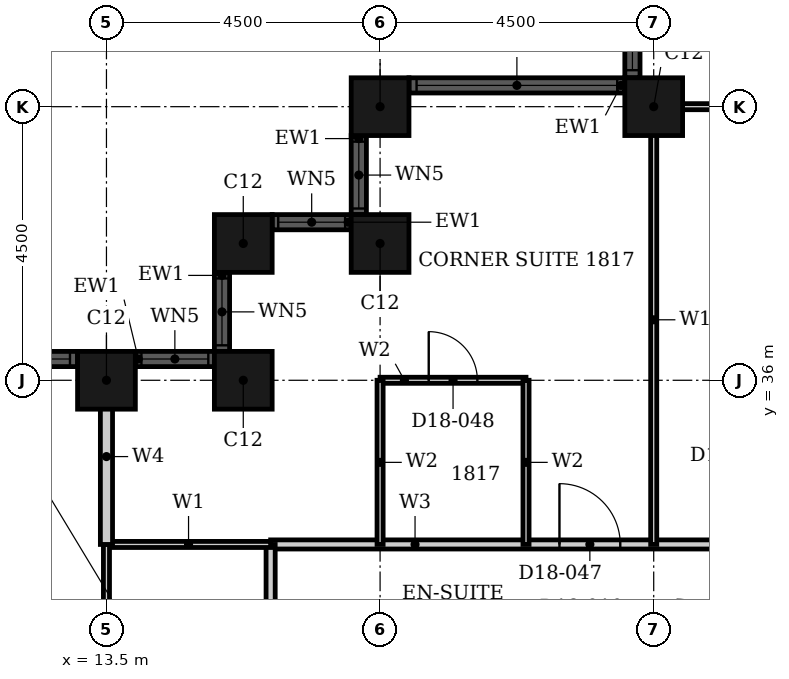
"""IFC4 building model, lengths in metres.
Left out: names, types, materials, properties, quantities, classifications, styles, units other than length and angle.
Written with IfcOpenShell. Run it as: python <this file> out.ifc"""

import sys

from ifc_helpers import new_model, si_unit, direction, frame, frame_2d, origin, origin_2d, place, context, subcontext, project, spatial, rectangle, hollow_rectangle, extrude, element, fill, save


model = new_model("IFC4")
c1 = context("Model", 3, precision=1e-05, world=origin(), true_north=direction((0.0, 1.0)))
c2 = subcontext(c1, "Body", "Model", "MODEL_VIEW")
j1 = project(units=[si_unit("LENGTHUNIT", "METRE"), si_unit("PLANEANGLEUNIT", "RADIAN")], contexts=[c1])
p1 = place(None, origin())
s1 = spatial("IfcSite", under=j1, at=p1, CompositionType="ELEMENT")
p2 = place(p1, origin())
s2 = spatial("IfcBuilding", under=s1, at=p2, CompositionType="ELEMENT")
p3 = place(p2, frame((0.0, 0.0, 78.0)))
s3 = spatial("IfcBuildingStorey", under=s2, at=p3, CompositionType="ELEMENT", Elevation=78.0)
for number, where, z_axis, x_axis in (
    (1, (22.5, 40.5, 0.0), (0.0, 0.0, 1.0), (1.0, 0.0, 0.0)),
    (2, (18.0, 40.5, 0.0), (0.0, 0.0, 1.0), (1.0, 0.0, 0.0)),
    (3, (18.0, 38.25, 0.0), (0.0, 0.0, 1.0), (1.0, 0.0, 0.0)),
    (4, (15.75, 38.25, 0.0), (0.0, 0.0, 1.0), (1.0, 0.0, 0.0)),
    (5, (15.75, 36.0, 0.0), (0.0, 0.0, 1.0), (1.0, 0.0, 0.0)),
    (6, (13.5, 36.0, 0.0), (0.0, 0.0, 1.0), (1.0, 0.0, 0.0)),
):
    element("IfcColumn", number, at=place(p3, frame(where, z_axis=z_axis, x_axis=x_axis)), inside=s3, PredefinedType="COLUMN", context=c2, shape_type="SweptSolid", body=[
        extrude(hollow_rectangle(XDim=0.95, YDim=0.95, WallThickness=0.03, at=origin_2d()), origin(), (0.0, 0.0, 1.0), 3.6),
    ])
p4 = place(p3, frame((22.15, 49.025, 0.0), z_axis=(0.0, 0.0, 1.0), x_axis=(0.0, -1.0, 0.0)))
e7 = element("IfcWall", 7, at=p4, inside=s3, PredefinedType="SOLIDWALL", context=c2, shape_type="SweptSolid", body=[
    extrude(rectangle(XDim=8.05, YDim=0.25, at=frame_2d((4.025, 0.0))), origin(), (0.0, 0.0, 1.0), 3.6),
])
p5 = place(p4, frame((0.125, 0.0, 0.9)))
e8 = element("IfcOpeningElement", 8, at=p5, cuts=e7, PredefinedType="OPENING", context=c2, shape_type="SweptSolid", body=[
    extrude(rectangle(XDim=3.3, YDim=2.08, at=frame_2d((1.65, 1.04))), frame((0.0, 0.135, 0.0), z_axis=(0.0, -1.0, 0.0), x_axis=(1.0, 0.0, 0.0)), (0.0, 0.0, 1.0), 0.27),
])
p6 = place(p4, frame((4.625, 0.0, 0.9)))
e9 = element("IfcOpeningElement", 9, at=p6, cuts=e7, PredefinedType="OPENING", context=c2, shape_type="SweptSolid", body=[
    extrude(rectangle(XDim=3.3, YDim=2.08, at=frame_2d((1.65, 1.04))), frame((0.0, 0.135, 0.0), z_axis=(0.0, -1.0, 0.0), x_axis=(1.0, 0.0, 0.0)), (0.0, 0.0, 1.0), 0.27),
])
p7 = place(p3, frame((22.025, 40.85, 0.0), z_axis=(0.0, 0.0, 1.0), x_axis=(-1.0, 0.0, 0.0)))
e10 = element("IfcWall", 10, at=p7, inside=s3, PredefinedType="SOLIDWALL", context=c2, shape_type="SweptSolid", body=[
    extrude(rectangle(XDim=3.55, YDim=0.25, at=frame_2d((1.775, 0.0))), origin(), (0.0, 0.0, 1.0), 3.6),
])
p8 = place(p7, frame((0.125, 0.0, 0.9)))
e11 = element("IfcOpeningElement", 11, at=p8, cuts=e10, PredefinedType="OPENING", context=c2, shape_type="SweptSolid", body=[
    extrude(rectangle(XDim=3.3, YDim=2.08, at=frame_2d((1.65, 1.04))), frame((0.0, 0.135, 0.0), z_axis=(0.0, -1.0, 0.0), x_axis=(1.0, 0.0, 0.0)), (0.0, 0.0, 1.0), 0.27),
])
p9 = place(p3, frame((17.65, 40.025, 0.0), z_axis=(0.0, 0.0, 1.0), x_axis=(0.0, -1.0, 0.0)))
e12 = element("IfcWall", 12, at=p9, inside=s3, PredefinedType="SOLIDWALL", context=c2, shape_type="SweptSolid", body=[
    extrude(rectangle(XDim=1.3, YDim=0.25, at=frame_2d((0.65, 0.0))), origin(), (0.0, 0.0, 1.0), 3.6),
])
p10 = place(p9, frame((0.1, 0.0, 0.9)))
e13 = element("IfcOpeningElement", 13, at=p10, cuts=e12, PredefinedType="OPENING", context=c2, shape_type="SweptSolid", body=[
    extrude(rectangle(XDim=1.1, YDim=2.08, at=frame_2d((0.55, 1.04))), frame((0.0, 0.135, 0.0), z_axis=(0.0, -1.0, 0.0), x_axis=(1.0, 0.0, 0.0)), (0.0, 0.0, 1.0), 0.27),
])
p11 = place(p3, frame((17.525, 38.6, 0.0), z_axis=(0.0, 0.0, 1.0), x_axis=(-1.0, 0.0, 0.0)))
e14 = element("IfcWall", 14, at=p11, inside=s3, PredefinedType="SOLIDWALL", context=c2, shape_type="SweptSolid", body=[
    extrude(rectangle(XDim=1.3, YDim=0.25, at=frame_2d((0.65, 0.0))), origin(), (0.0, 0.0, 1.0), 3.6),
])
p12 = place(p11, frame((0.1, 0.0, 0.9)))
e15 = element("IfcOpeningElement", 15, at=p12, cuts=e14, PredefinedType="OPENING", context=c2, shape_type="SweptSolid", body=[
    extrude(rectangle(XDim=1.1, YDim=2.08, at=frame_2d((0.55, 1.04))), frame((0.0, 0.135, 0.0), z_axis=(0.0, -1.0, 0.0), x_axis=(1.0, 0.0, 0.0)), (0.0, 0.0, 1.0), 0.27),
])
p13 = place(p3, frame((15.4, 37.775, 0.0), z_axis=(0.0, 0.0, 1.0), x_axis=(0.0, -1.0, 0.0)))
e16 = element("IfcWall", 16, at=p13, inside=s3, PredefinedType="SOLIDWALL", context=c2, shape_type="SweptSolid", body=[
    extrude(rectangle(XDim=1.3, YDim=0.25, at=frame_2d((0.65, 0.0))), origin(), (0.0, 0.0, 1.0), 3.6),
])
p14 = place(p13, frame((0.1, 0.0, 0.9)))
e17 = element("IfcOpeningElement", 17, at=p14, cuts=e16, PredefinedType="OPENING", context=c2, shape_type="SweptSolid", body=[
    extrude(rectangle(XDim=1.1, YDim=2.08, at=frame_2d((0.55, 1.04))), frame((0.0, 0.135, 0.0), z_axis=(0.0, -1.0, 0.0), x_axis=(1.0, 0.0, 0.0)), (0.0, 0.0, 1.0), 0.27),
])
p15 = place(p3, frame((15.275, 36.35, 0.0), z_axis=(0.0, 0.0, 1.0), x_axis=(-1.0, 0.0, 0.0)))
e18 = element("IfcWall", 18, at=p15, inside=s3, PredefinedType="SOLIDWALL", context=c2, shape_type="SweptSolid", body=[
    extrude(rectangle(XDim=1.3, YDim=0.25, at=frame_2d((0.65, 0.0))), origin(), (0.0, 0.0, 1.0), 3.6),
])
p16 = place(p15, frame((0.1, 0.0, 0.9)))
e19 = element("IfcOpeningElement", 19, at=p16, cuts=e18, PredefinedType="OPENING", context=c2, shape_type="SweptSolid", body=[
    extrude(rectangle(XDim=1.1, YDim=2.08, at=frame_2d((0.55, 1.04))), frame((0.0, 0.135, 0.0), z_axis=(0.0, -1.0, 0.0), x_axis=(1.0, 0.0, 0.0)), (0.0, 0.0, 1.0), 0.27),
])
p17 = place(p3, frame((13.025, 36.35, 0.0), z_axis=(0.0, 0.0, 1.0), x_axis=(-1.0, 0.0, 0.0)))
e20 = element("IfcWall", 20, at=p17, inside=s3, PredefinedType="SOLIDWALL", context=c2, shape_type="SweptSolid", body=[
    extrude(rectangle(XDim=8.05, YDim=0.25, at=frame_2d((4.025, 0.0))), origin(), (0.0, 0.0, 1.0), 3.6),
])
p18 = place(p17, frame((0.125, 0.0, 0.9)))
e21 = element("IfcOpeningElement", 21, at=p18, cuts=e20, PredefinedType="OPENING", context=c2, shape_type="SweptSolid", body=[
    extrude(rectangle(XDim=3.3, YDim=2.08, at=frame_2d((1.65, 1.04))), frame((0.0, 0.135, 0.0), z_axis=(0.0, -1.0, 0.0), x_axis=(1.0, 0.0, 0.0)), (0.0, 0.0, 1.0), 0.27),
])
p19 = place(p17, frame((4.625, 0.0, 0.9)))
e22 = element("IfcOpeningElement", 22, at=p19, cuts=e20, PredefinedType="OPENING", context=c2, shape_type="SweptSolid", body=[
    extrude(rectangle(XDim=3.3, YDim=2.08, at=frame_2d((1.65, 1.04))), frame((0.0, 0.135, 0.0), z_axis=(0.0, -1.0, 0.0), x_axis=(1.0, 0.0, 0.0)), (0.0, 0.0, 1.0), 0.27),
])
p20 = place(p3, frame((16.2, 33.3, 0.0), z_axis=(0.0, 0.0, 1.0), x_axis=(1.0, 0.0, 0.0)))
e23 = element("IfcWall", 23, at=p20, inside=s3, PredefinedType="PARTITIONING", context=c2, shape_type="SweptSolid", body=[
    extrude(rectangle(XDim=15.3, YDim=0.15, at=frame_2d((7.65, 0.0))), origin(), (0.0, 0.0, 1.0), 3.3),
])
p21 = place(p20, frame((4.75, 0.0, 0.0)))
e24 = element("IfcOpeningElement", 24, at=p21, cuts=e23, PredefinedType="OPENING", context=c2, shape_type="SweptSolid", body=[
    extrude(rectangle(XDim=1.0, YDim=2.1, at=frame_2d((0.5, 1.05))), frame((0.0, 0.085, 0.0), z_axis=(0.0, -1.0, 0.0), x_axis=(1.0, 0.0, 0.0)), (0.0, 0.0, 1.0), 0.17),
])
p22 = place(p20, frame((7.65, 0.0, 0.0)))
e25 = element("IfcOpeningElement", 25, at=p22, cuts=e23, PredefinedType="OPENING", context=c2, shape_type="SweptSolid", body=[
    extrude(rectangle(XDim=0.9, YDim=2.1, at=frame_2d((0.45, 1.05))), frame((0.0, 0.085, 0.0), z_axis=(0.0, -1.0, 0.0), x_axis=(1.0, 0.0, 0.0)), (0.0, 0.0, 1.0), 0.17),
])
p23 = place(p20, frame((12.15, 0.0, 0.0)))
e26 = element("IfcOpeningElement", 26, at=p23, cuts=e23, PredefinedType="OPENING", context=c2, shape_type="SweptSolid", body=[
    extrude(rectangle(XDim=0.9, YDim=2.1, at=frame_2d((0.45, 1.05))), frame((0.0, 0.085, 0.0), z_axis=(0.0, -1.0, 0.0), x_axis=(1.0, 0.0, 0.0)), (0.0, 0.0, 1.0), 0.17),
])
p24 = place(p3, frame((16.2, 27.0, 0.0), z_axis=(0.0, 0.0, 1.0), x_axis=(0.0, 1.0, 0.0)))
e27 = element("IfcWall", 27, at=p24, inside=s3, PredefinedType="PARTITIONING", context=c2, shape_type="SweptSolid", body=[
    extrude(rectangle(XDim=6.3, YDim=0.15, at=frame_2d((3.15, 0.0))), origin(), (0.0, 0.0, 1.0), 3.3),
])
p25 = place(p24, frame((2.55, 0.0, 0.0)))
e28 = element("IfcOpeningElement", 28, at=p25, cuts=e27, PredefinedType="OPENING", context=c2, shape_type="SweptSolid", body=[
    extrude(rectangle(XDim=0.9, YDim=2.1, at=frame_2d((0.45, 1.05))), frame((0.0, 0.085, 0.0), z_axis=(0.0, -1.0, 0.0), x_axis=(1.0, 0.0, 0.0)), (0.0, 0.0, 1.0), 0.17),
])
p26 = place(p3, frame((13.5, 33.3, 0.0), z_axis=(0.0, 0.0, 1.0), x_axis=(1.0, 0.0, 0.0)))
e29 = element("IfcWall", 29, at=p26, inside=s3, PredefinedType="PARTITIONING", context=c2, shape_type="SweptSolid", body=[
    extrude(rectangle(XDim=2.7, YDim=0.1, at=frame_2d((1.35, 0.0))), origin(), (0.0, 0.0, 1.0), 3.3),
])
p27 = place(p3, frame((22.31, 40.5, 0.0), z_axis=(0.0, 0.0, 1.0), x_axis=(1.0, 0.0, 0.0)))
e30 = element("IfcWall", 30, at=p27, inside=s3, PredefinedType="PARTITIONING", context=c2, shape_type="SweptSolid", body=[
    extrude(rectangle(XDim=9.19, YDim=0.1, at=frame_2d((4.595, 0.0))), origin(), (0.0, 0.0, 1.0), 2.38),
])
p28 = place(p3, frame((13.5, 27.0, 0.0), z_axis=(0.0, 0.0, 1.0), x_axis=(0.0, 1.0, 0.0)))
e31 = element("IfcWall", 31, at=p28, inside=s3, PredefinedType="PARTITIONING", context=c2, shape_type="SweptSolid", body=[
    extrude(rectangle(XDim=6.3, YDim=0.1, at=frame_2d((3.15, 0.0))), origin(), (0.0, 0.0, 1.0), 2.38),
])
p29 = place(p3, frame((22.5, 33.3, 0.0), z_axis=(0.0, 0.0, 1.0), x_axis=(0.0, 1.0, 0.0)))
e32 = element("IfcWall", 32, at=p29, inside=s3, PredefinedType="PARTITIONING", context=c2, shape_type="SweptSolid", body=[
    extrude(rectangle(XDim=7.39, YDim=0.1, at=frame_2d((3.695, 0.0))), origin(), (0.0, 0.0, 1.0), 3.3),
])
p30 = place(p3, frame((13.5, 33.3, 0.0), z_axis=(0.0, 0.0, 1.0), x_axis=(0.0, 1.0, 0.0)))
e33 = element("IfcWall", 33, at=p30, inside=s3, PredefinedType="PARTITIONING", context=c2, shape_type="SweptSolid", body=[
    extrude(rectangle(XDim=2.89, YDim=0.2, at=frame_2d((1.445, 0.0))), origin(), (0.0, 0.0, 1.0), 2.38),
])
p31 = place(p3, frame((18.0, 36.0, 0.0), z_axis=(0.0, 0.0, 1.0), x_axis=(1.0, 0.0, 0.0)))
e34 = element("IfcWall", 34, at=p31, inside=s3, PredefinedType="PARTITIONING", context=c2, shape_type="SweptSolid", body=[
    extrude(rectangle(XDim=2.4, YDim=0.1, at=frame_2d((1.2, 0.0))), origin(), (0.0, 0.0, 1.0), 3.3),
])
p32 = place(p31, frame((0.8, 0.0, 0.0)))
e35 = element("IfcOpeningElement", 35, at=p32, cuts=e34, PredefinedType="OPENING", context=c2, shape_type="SweptSolid", body=[
    extrude(rectangle(XDim=0.8, YDim=2.1, at=frame_2d((0.4, 1.05))), frame((0.0, 0.06, 0.0), z_axis=(0.0, -1.0, 0.0), x_axis=(1.0, 0.0, 0.0)), (0.0, 0.0, 1.0), 0.12),
])
for number, where, z_axis, x_axis in (
    (36, (18.0, 33.3, 0.0), (0.0, 0.0, 1.0), (0.0, 1.0, 0.0)),
    (37, (20.4, 33.3, 0.0), (0.0, 0.0, 1.0), (0.0, 1.0, 0.0)),
):
    element("IfcWall", number, at=place(p3, frame(where, z_axis=z_axis, x_axis=x_axis)), inside=s3, PredefinedType="PARTITIONING", context=c2, shape_type="SweptSolid", body=[
        extrude(rectangle(XDim=2.7, YDim=0.1, at=frame_2d((1.35, 0.0))), origin(), (0.0, 0.0, 1.0), 3.3),
    ])
p33 = place(p6, origin())
e38 = element("IfcWindow", 38, at=p33, inside=s3, PartitioningType="SINGLE_PANEL", PredefinedType="WINDOW", context=c2, shape_type="SweptSolid", body=[
    extrude(rectangle(XDim=3.3, YDim=2.08, at=frame_2d((1.65, 1.04))), frame((0.0, 0.03, 0.0), z_axis=(0.0, -1.0, 0.0), x_axis=(1.0, 0.0, 0.0)), (0.0, 0.0, 1.0), 0.06),
])
fill(e9, e38)
p34 = place(p8, origin())
e39 = element("IfcWindow", 39, at=p34, inside=s3, PartitioningType="SINGLE_PANEL", PredefinedType="WINDOW", context=c2, shape_type="SweptSolid", body=[
    extrude(rectangle(XDim=3.3, YDim=2.08, at=frame_2d((1.65, 1.04))), frame((0.0, 0.03, 0.0), z_axis=(0.0, -1.0, 0.0), x_axis=(1.0, 0.0, 0.0)), (0.0, 0.0, 1.0), 0.06),
])
fill(e11, e39)
p35 = place(p10, origin())
e40 = element("IfcWindow", 40, at=p35, inside=s3, PartitioningType="SINGLE_PANEL", PredefinedType="WINDOW", context=c2, shape_type="SweptSolid", body=[
    extrude(rectangle(XDim=1.1, YDim=2.08, at=frame_2d((0.55, 1.04))), frame((0.0, 0.03, 0.0), z_axis=(0.0, -1.0, 0.0), x_axis=(1.0, 0.0, 0.0)), (0.0, 0.0, 1.0), 0.06),
])
fill(e13, e40)
p36 = place(p12, origin())
e41 = element("IfcWindow", 41, at=p36, inside=s3, PartitioningType="SINGLE_PANEL", PredefinedType="WINDOW", context=c2, shape_type="SweptSolid", body=[
    extrude(rectangle(XDim=1.1, YDim=2.08, at=frame_2d((0.55, 1.04))), frame((0.0, 0.03, 0.0), z_axis=(0.0, -1.0, 0.0), x_axis=(1.0, 0.0, 0.0)), (0.0, 0.0, 1.0), 0.06),
])
fill(e15, e41)
p37 = place(p14, origin())
e42 = element("IfcWindow", 42, at=p37, inside=s3, PartitioningType="SINGLE_PANEL", PredefinedType="WINDOW", context=c2, shape_type="SweptSolid", body=[
    extrude(rectangle(XDim=1.1, YDim=2.08, at=frame_2d((0.55, 1.04))), frame((0.0, 0.03, 0.0), z_axis=(0.0, -1.0, 0.0), x_axis=(1.0, 0.0, 0.0)), (0.0, 0.0, 1.0), 0.06),
])
fill(e17, e42)
p38 = place(p16, origin())
e43 = element("IfcWindow", 43, at=p38, inside=s3, PartitioningType="SINGLE_PANEL", PredefinedType="WINDOW", context=c2, shape_type="SweptSolid", body=[
    extrude(rectangle(XDim=1.1, YDim=2.08, at=frame_2d((0.55, 1.04))), frame((0.0, 0.03, 0.0), z_axis=(0.0, -1.0, 0.0), x_axis=(1.0, 0.0, 0.0)), (0.0, 0.0, 1.0), 0.06),
])
fill(e19, e43)
p39 = place(p18, origin())
e44 = element("IfcWindow", 44, at=p39, inside=s3, PartitioningType="SINGLE_PANEL", PredefinedType="WINDOW", context=c2, shape_type="SweptSolid", body=[
    extrude(rectangle(XDim=3.3, YDim=2.08, at=frame_2d((1.65, 1.04))), frame((0.0, 0.03, 0.0), z_axis=(0.0, -1.0, 0.0), x_axis=(1.0, 0.0, 0.0)), (0.0, 0.0, 1.0), 0.06),
])
fill(e21, e44)
p40 = place(p21, origin())
e45 = element("IfcDoor", 45, at=p40, inside=s3, OperationType="SINGLE_SWING_RIGHT", PredefinedType="DOOR", context=c2, shape_type="SweptSolid", body=[
    extrude(rectangle(XDim=1.0, YDim=2.1, at=frame_2d((0.5, 1.05))), frame((0.0, 0.025, 0.0), z_axis=(0.0, -1.0, 0.0), x_axis=(1.0, 0.0, 0.0)), (0.0, 0.0, 1.0), 0.05),
])
fill(e24, e45)
p41 = place(p32, origin())
e46 = element("IfcDoor", 46, at=p41, inside=s3, OperationType="SINGLE_SWING_RIGHT", PredefinedType="DOOR", context=c2, shape_type="SweptSolid", body=[
    extrude(rectangle(XDim=0.8, YDim=2.1, at=frame_2d((0.4, 1.05))), frame((0.0, 0.025, 0.0), z_axis=(0.0, -1.0, 0.0), x_axis=(1.0, 0.0, 0.0)), (0.0, 0.0, 1.0), 0.05),
])
fill(e35, e46)
save(model, sys.argv[1])
